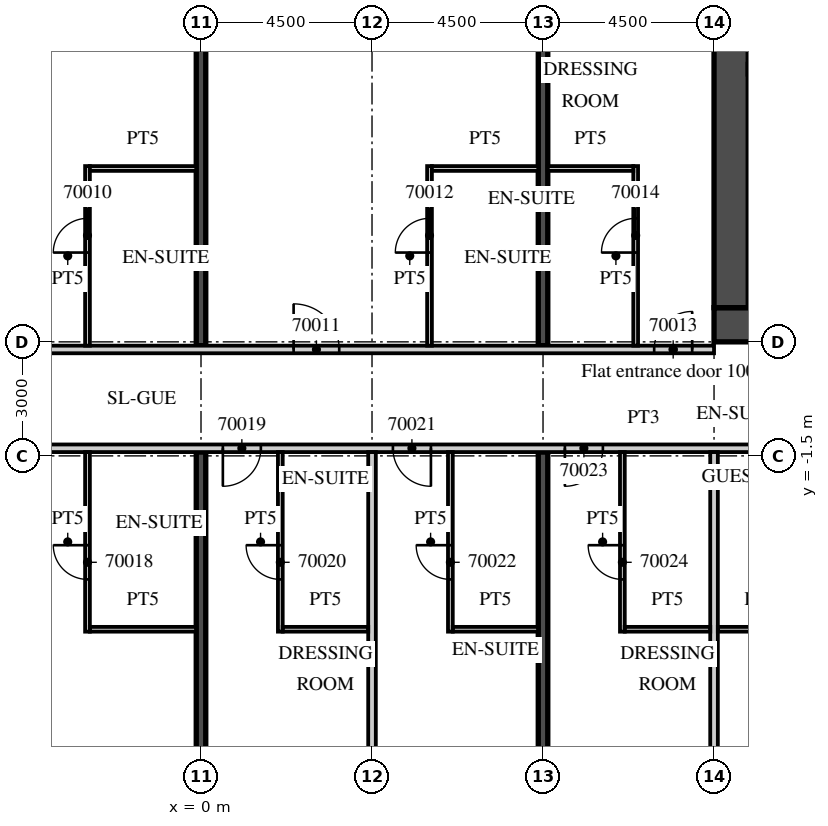
"""IFC4 building model, lengths in metres.
Left out: names, types, materials, properties, quantities, classifications, styles, units other than length and angle.
Written with IfcOpenShell. Run it as: python <this file> out.ifc"""

import sys

from ifc_helpers import new_model, si_unit, direction, frame, frame_2d, origin, place, context, subcontext, project, spatial, rectangle, extrude, element, fill, save


model = new_model("IFC4")
c1 = context("Model", 3, precision=1e-05, world=origin(), true_north=direction((0.0, 1.0)))
c2 = subcontext(c1, "Body", "Model", "MODEL_VIEW")
j1 = project(units=[si_unit("LENGTHUNIT", "METRE"), si_unit("PLANEANGLEUNIT", "RADIAN")], contexts=[c1])
p1 = place(None, origin())
s1 = spatial("IfcSite", under=j1, at=p1, CompositionType="ELEMENT")
p2 = place(p1, origin())
s2 = spatial("IfcBuilding", under=s1, at=p2, CompositionType="ELEMENT")
p3 = place(p2, frame((0.0, 0.0, 281.7)))
s3 = spatial("IfcBuildingStorey", under=s2, at=p3, CompositionType="ELEMENT", Elevation=281.7)
p4 = place(p3, frame((0.0, -20.074, 0.0), z_axis=(0.0, 0.0, 1.0), x_axis=(0.0, 1.0, 0.0)))
e1 = element("IfcWall", 1, at=p4, inside=s3, PredefinedType="SHEAR", context=c2, shape_type="SweptSolid", body=[
    extrude(rectangle(XDim=18.674, YDim=0.25, at=frame_2d((9.337, 0.0))), origin(), (0.0, 0.0, 1.0), 3.3),
])
p5 = place(p3, frame((0.0, 1.4, 0.0), z_axis=(0.0, 0.0, 1.0), x_axis=(0.0, 1.0, 0.0)))
e2 = element("IfcWall", 2, at=p5, inside=s3, PredefinedType="SHEAR", context=c2, shape_type="SweptSolid", body=[
    extrude(rectangle(XDim=17.763, YDim=0.25, at=frame_2d((8.881, 0.0))), origin(), (0.0, 0.0, 1.0), 3.3),
])
p6 = place(p3, frame((9.0, -19.207, 0.0), z_axis=(0.0, 0.0, 1.0), x_axis=(0.0, 1.0, 0.0)))
e3 = element("IfcWall", 3, at=p6, inside=s3, PredefinedType="SHEAR", context=c2, shape_type="SweptSolid", body=[
    extrude(rectangle(XDim=17.807, YDim=0.25, at=frame_2d((8.904, 0.0))), origin(), (0.0, 0.0, 1.0), 3.3),
])
p7 = place(p3, frame((9.0, 1.4, 0.0), z_axis=(0.0, 0.0, 1.0), x_axis=(0.0, 1.0, 0.0)))
e4 = element("IfcWall", 4, at=p7, inside=s3, PredefinedType="SHEAR", context=c2, shape_type="SweptSolid", body=[
    extrude(rectangle(XDim=18.629, YDim=0.25, at=frame_2d((9.315, 0.0))), origin(), (0.0, 0.0, 1.0), 3.3),
])
p8 = place(p3, frame((-39.909, 1.3, 0.0), z_axis=(0.0, 0.0, 1.0), x_axis=(1.0, 0.0, 0.0)))
e5 = element("IfcWall", 5, at=p8, inside=s3, PredefinedType="PARTITIONING", context=c2, shape_type="SweptSolid", body=[
    extrude(rectangle(XDim=53.409, YDim=0.2, at=frame_2d((26.705, 0.0))), origin(), (0.0, 0.0, 1.0), 3.02),
])
p9 = place(p8, frame((0.15, 0.0, 0.0)))
e6 = element("IfcOpeningElement", 6, at=p9, cuts=e5, PredefinedType="OPENING", context=c2, shape_type="SweptSolid", body=[
    extrude(rectangle(XDim=0.9, YDim=2.1, at=frame_2d((0.45, 1.05))), frame((0.0, 0.11, 0.0), z_axis=(0.0, -1.0, 0.0), x_axis=(1.0, 0.0, 0.0)), (0.0, 0.0, 1.0), 0.22),
])
p10 = place(p8, frame((6.347, 0.0, 0.0)))
e7 = element("IfcOpeningElement", 7, at=p10, cuts=e5, PredefinedType="OPENING", context=c2, shape_type="SweptSolid", body=[
    extrude(rectangle(XDim=1.2, YDim=2.1, at=frame_2d((0.6, 1.05))), frame((0.0, 0.11, 0.0), z_axis=(0.0, -1.0, 0.0), x_axis=(1.0, 0.0, 0.0)), (0.0, 0.0, 1.0), 0.22),
])
p11 = place(p8, frame((15.347, 0.0, 0.0)))
e8 = element("IfcOpeningElement", 8, at=p11, cuts=e5, PredefinedType="OPENING", context=c2, shape_type="SweptSolid", body=[
    extrude(rectangle(XDim=1.2, YDim=2.1, at=frame_2d((0.6, 1.05))), frame((0.0, 0.11, 0.0), z_axis=(0.0, -1.0, 0.0), x_axis=(1.0, 0.0, 0.0)), (0.0, 0.0, 1.0), 0.22),
])
p12 = place(p8, frame((24.346, 0.0, 0.0)))
e9 = element("IfcOpeningElement", 9, at=p12, cuts=e5, PredefinedType="OPENING", context=c2, shape_type="SweptSolid", body=[
    extrude(rectangle(XDim=1.2, YDim=2.1, at=frame_2d((0.6, 1.05))), frame((0.0, 0.11, 0.0), z_axis=(0.0, -1.0, 0.0), x_axis=(1.0, 0.0, 0.0)), (0.0, 0.0, 1.0), 0.22),
])
p13 = place(p8, frame((33.346, 0.0, 0.0)))
e10 = element("IfcOpeningElement", 10, at=p13, cuts=e5, PredefinedType="OPENING", context=c2, shape_type="SweptSolid", body=[
    extrude(rectangle(XDim=1.2, YDim=2.1, at=frame_2d((0.6, 1.05))), frame((0.0, 0.11, 0.0), z_axis=(0.0, -1.0, 0.0), x_axis=(1.0, 0.0, 0.0)), (0.0, 0.0, 1.0), 0.22),
])
p14 = place(p8, frame((42.346, 0.0, 0.0)))
e11 = element("IfcOpeningElement", 11, at=p14, cuts=e5, PredefinedType="OPENING", context=c2, shape_type="SweptSolid", body=[
    extrude(rectangle(XDim=1.2, YDim=2.1, at=frame_2d((0.6, 1.05))), frame((0.0, 0.11, 0.0), z_axis=(0.0, -1.0, 0.0), x_axis=(1.0, 0.0, 0.0)), (0.0, 0.0, 1.0), 0.22),
])
p15 = place(p8, frame((51.834, 0.0, 0.0)))
e12 = element("IfcOpeningElement", 12, at=p15, cuts=e5, PredefinedType="OPENING", context=c2, shape_type="SweptSolid", body=[
    extrude(rectangle(XDim=1.0, YDim=2.1, at=frame_2d((0.5, 1.05))), frame((0.0, 0.11, 0.0), z_axis=(0.0, -1.0, 0.0), x_axis=(1.0, 0.0, 0.0)), (0.0, 0.0, 1.0), 0.22),
])
p16 = place(p3, frame((-2.987, 1.4, 0.0), z_axis=(0.0, 0.0, 1.0), x_axis=(0.0, 1.0, 0.0)))
e13 = element("IfcWall", 13, at=p16, inside=s3, PredefinedType="PARTITIONING", context=c2, shape_type="SweptSolid", body=[
    extrude(rectangle(XDim=4.725, YDim=0.125, at=frame_2d((2.363, 0.0))), origin(), (0.0, 0.0, 1.0), 3.02),
])
p17 = place(p16, frame((2.45, 0.0, 0.0)))
e14 = element("IfcOpeningElement", 14, at=p17, cuts=e13, PredefinedType="OPENING", context=c2, shape_type="SweptSolid", body=[
    extrude(rectangle(XDim=0.9, YDim=2.1, at=frame_2d((0.45, 1.05))), frame((0.0, 0.073, 0.0), z_axis=(0.0, -1.0, 0.0), x_axis=(1.0, 0.0, 0.0)), (0.0, 0.0, 1.0), 0.145),
])
p18 = place(p3, frame((-2.925, 6.062, 0.0), z_axis=(0.0, 0.0, 1.0), x_axis=(1.0, 0.0, 0.0)))
e15 = element("IfcWall", 15, at=p18, inside=s3, PredefinedType="PARTITIONING", context=c2, shape_type="SweptSolid", body=[
    extrude(rectangle(XDim=2.8, YDim=0.125, at=frame_2d((1.4, 0.0))), origin(), (0.0, 0.0, 1.0), 3.02),
])
p19 = place(p3, frame((6.013, 1.4, 0.0), z_axis=(0.0, 0.0, 1.0), x_axis=(0.0, 1.0, 0.0)))
e16 = element("IfcWall", 16, at=p19, inside=s3, PredefinedType="PARTITIONING", context=c2, shape_type="SweptSolid", body=[
    extrude(rectangle(XDim=4.725, YDim=0.125, at=frame_2d((2.363, 0.0))), origin(), (0.0, 0.0, 1.0), 3.02),
])
p20 = place(p19, frame((2.45, 0.0, 0.0)))
e17 = element("IfcOpeningElement", 17, at=p20, cuts=e16, PredefinedType="OPENING", context=c2, shape_type="SweptSolid", body=[
    extrude(rectangle(XDim=0.9, YDim=2.1, at=frame_2d((0.45, 1.05))), frame((0.0, 0.073, 0.0), z_axis=(0.0, -1.0, 0.0), x_axis=(1.0, 0.0, 0.0)), (0.0, 0.0, 1.0), 0.145),
])
p21 = place(p3, frame((6.075, 6.062, 0.0), z_axis=(0.0, 0.0, 1.0), x_axis=(1.0, 0.0, 0.0)))
e18 = element("IfcWall", 18, at=p21, inside=s3, PredefinedType="PARTITIONING", context=c2, shape_type="SweptSolid", body=[
    extrude(rectangle(XDim=2.8, YDim=0.125, at=frame_2d((1.4, 0.0))), origin(), (0.0, 0.0, 1.0), 3.02),
])
p22 = place(p3, frame((11.438, 1.4, 0.0), z_axis=(0.0, 0.0, 1.0), x_axis=(0.0, 1.0, 0.0)))
e19 = element("IfcWall", 19, at=p22, inside=s3, PredefinedType="PARTITIONING", context=c2, shape_type="SweptSolid", body=[
    extrude(rectangle(XDim=4.725, YDim=0.125, at=frame_2d((2.363, 0.0))), origin(), (0.0, 0.0, 1.0), 3.02),
])
p23 = place(p22, frame((2.45, 0.0, 0.0)))
e20 = element("IfcOpeningElement", 20, at=p23, cuts=e19, PredefinedType="OPENING", context=c2, shape_type="SweptSolid", body=[
    extrude(rectangle(XDim=0.9, YDim=2.1, at=frame_2d((0.45, 1.05))), frame((0.0, 0.073, 0.0), z_axis=(0.0, -1.0, 0.0), x_axis=(1.0, 0.0, 0.0)), (0.0, 0.0, 1.0), 0.145),
])
p24 = place(p3, frame((9.125, 6.062, 0.0), z_axis=(0.0, 0.0, 1.0), x_axis=(1.0, 0.0, 0.0)))
e21 = element("IfcWall", 21, at=p24, inside=s3, PredefinedType="PARTITIONING", context=c2, shape_type="SweptSolid", body=[
    extrude(rectangle(XDim=2.25, YDim=0.125, at=frame_2d((1.125, 0.0))), origin(), (0.0, 0.0, 1.0), 3.02),
])
p25 = place(p3, frame((-13.5, -1.3, 0.0), z_axis=(0.0, 0.0, 1.0), x_axis=(1.0, 0.0, 0.0)))
e22 = element("IfcWall", 22, at=p25, inside=s3, PredefinedType="PARTITIONING", context=c2, shape_type="SweptSolid", body=[
    extrude(rectangle(XDim=50.293, YDim=0.2, at=frame_2d((25.146, 0.0))), origin(), (0.0, 0.0, 1.0), 3.02),
])
p26 = place(p25, frame((2.925, 0.0, 0.0)))
e23 = element("IfcOpeningElement", 23, at=p26, cuts=e22, PredefinedType="OPENING", context=c2, shape_type="SweptSolid", body=[
    extrude(rectangle(XDim=1.0, YDim=2.1, at=frame_2d((0.5, 1.05))), frame((0.0, 0.11, 0.0), z_axis=(0.0, -1.0, 0.0), x_axis=(1.0, 0.0, 0.0)), (0.0, 0.0, 1.0), 0.22),
])
p27 = place(p25, frame((6.938, 0.0, 0.0)))
e24 = element("IfcOpeningElement", 24, at=p27, cuts=e22, PredefinedType="OPENING", context=c2, shape_type="SweptSolid", body=[
    extrude(rectangle(XDim=1.2, YDim=2.1, at=frame_2d((0.6, 1.05))), frame((0.0, 0.11, 0.0), z_axis=(0.0, -1.0, 0.0), x_axis=(1.0, 0.0, 0.0)), (0.0, 0.0, 1.0), 0.22),
])
p28 = place(p25, frame((14.075, 0.0, 0.0)))
e25 = element("IfcOpeningElement", 25, at=p28, cuts=e22, PredefinedType="OPENING", context=c2, shape_type="SweptSolid", body=[
    extrude(rectangle(XDim=1.0, YDim=2.1, at=frame_2d((0.5, 1.05))), frame((0.0, 0.11, 0.0), z_axis=(0.0, -1.0, 0.0), x_axis=(1.0, 0.0, 0.0)), (0.0, 0.0, 1.0), 0.22),
])
p29 = place(p25, frame((18.55, 0.0, 0.0)))
e26 = element("IfcOpeningElement", 26, at=p29, cuts=e22, PredefinedType="OPENING", context=c2, shape_type="SweptSolid", body=[
    extrude(rectangle(XDim=1.0, YDim=2.1, at=frame_2d((0.5, 1.05))), frame((0.0, 0.11, 0.0), z_axis=(0.0, -1.0, 0.0), x_axis=(1.0, 0.0, 0.0)), (0.0, 0.0, 1.0), 0.22),
])
p30 = place(p25, frame((23.075, 0.0, 0.0)))
e27 = element("IfcOpeningElement", 27, at=p30, cuts=e22, PredefinedType="OPENING", context=c2, shape_type="SweptSolid", body=[
    extrude(rectangle(XDim=1.0, YDim=2.1, at=frame_2d((0.5, 1.05))), frame((0.0, 0.11, 0.0), z_axis=(0.0, -1.0, 0.0), x_axis=(1.0, 0.0, 0.0)), (0.0, 0.0, 1.0), 0.22),
])
p31 = place(p25, frame((29.925, 0.0, 0.0)))
e28 = element("IfcOpeningElement", 28, at=p31, cuts=e22, PredefinedType="OPENING", context=c2, shape_type="SweptSolid", body=[
    extrude(rectangle(XDim=1.0, YDim=2.1, at=frame_2d((0.5, 1.05))), frame((0.0, 0.11, 0.0), z_axis=(0.0, -1.0, 0.0), x_axis=(1.0, 0.0, 0.0)), (0.0, 0.0, 1.0), 0.22),
])
p32 = place(p25, frame((32.075, 0.0, 0.0)))
e29 = element("IfcOpeningElement", 29, at=p32, cuts=e22, PredefinedType="OPENING", context=c2, shape_type="SweptSolid", body=[
    extrude(rectangle(XDim=1.0, YDim=2.1, at=frame_2d((0.5, 1.05))), frame((0.0, 0.11, 0.0), z_axis=(0.0, -1.0, 0.0), x_axis=(1.0, 0.0, 0.0)), (0.0, 0.0, 1.0), 0.22),
])
p33 = place(p25, frame((36.55, 0.0, 0.0)))
e30 = element("IfcOpeningElement", 30, at=p33, cuts=e22, PredefinedType="OPENING", context=c2, shape_type="SweptSolid", body=[
    extrude(rectangle(XDim=1.0, YDim=2.1, at=frame_2d((0.5, 1.05))), frame((0.0, 0.11, 0.0), z_axis=(0.0, -1.0, 0.0), x_axis=(1.0, 0.0, 0.0)), (0.0, 0.0, 1.0), 0.22),
])
p34 = place(p25, frame((42.938, 0.0, 0.0)))
e31 = element("IfcOpeningElement", 31, at=p34, cuts=e22, PredefinedType="OPENING", context=c2, shape_type="SweptSolid", body=[
    extrude(rectangle(XDim=1.2, YDim=2.1, at=frame_2d((0.6, 1.05))), frame((0.0, 0.11, 0.0), z_axis=(0.0, -1.0, 0.0), x_axis=(1.0, 0.0, 0.0)), (0.0, 0.0, 1.0), 0.22),
])
p35 = place(p3, frame((-2.987, -6.125, 0.0), z_axis=(0.0, 0.0, 1.0), x_axis=(0.0, 1.0, 0.0)))
e32 = element("IfcWall", 32, at=p35, inside=s3, PredefinedType="PARTITIONING", context=c2, shape_type="SweptSolid", body=[
    extrude(rectangle(XDim=4.725, YDim=0.125, at=frame_2d((2.363, 0.0))), origin(), (0.0, 0.0, 1.0), 3.02),
])
p36 = place(p35, frame((1.375, 0.0, 0.0)))
e33 = element("IfcOpeningElement", 33, at=p36, cuts=e32, PredefinedType="OPENING", context=c2, shape_type="SweptSolid", body=[
    extrude(rectangle(XDim=0.9, YDim=2.1, at=frame_2d((0.45, 1.05))), frame((0.0, 0.073, 0.0), z_axis=(0.0, -1.0, 0.0), x_axis=(1.0, 0.0, 0.0)), (0.0, 0.0, 1.0), 0.145),
])
p37 = place(p3, frame((-2.925, -6.062, 0.0), z_axis=(0.0, 0.0, 1.0), x_axis=(1.0, 0.0, 0.0)))
e34 = element("IfcWall", 34, at=p37, inside=s3, PredefinedType="PARTITIONING", context=c2, shape_type="SweptSolid", body=[
    extrude(rectangle(XDim=2.8, YDim=0.125, at=frame_2d((1.4, 0.0))), origin(), (0.0, 0.0, 1.0), 3.02),
])
p38 = place(p3, frame((4.5, -19.663, 0.0), z_axis=(0.0, 0.0, 1.0), x_axis=(0.0, 1.0, 0.0)))
e35 = element("IfcWall", 35, at=p38, inside=s3, PredefinedType="PARTITIONING", context=c2, shape_type="SweptSolid", body=[
    extrude(rectangle(XDim=18.263, YDim=0.2, at=frame_2d((9.132, 0.0))), origin(), (0.0, 0.0, 1.0), 3.02),
])
p39 = place(p3, frame((2.087, -6.125, 0.0), z_axis=(0.0, 0.0, 1.0), x_axis=(0.0, 1.0, 0.0)))
e36 = element("IfcWall", 36, at=p39, inside=s3, PredefinedType="PARTITIONING", context=c2, shape_type="SweptSolid", body=[
    extrude(rectangle(XDim=4.725, YDim=0.125, at=frame_2d((2.363, 0.0))), origin(), (0.0, 0.0, 1.0), 3.02),
])
p40 = place(p39, frame((1.375, 0.0, 0.0)))
e37 = element("IfcOpeningElement", 37, at=p40, cuts=e36, PredefinedType="OPENING", context=c2, shape_type="SweptSolid", body=[
    extrude(rectangle(XDim=0.9, YDim=2.1, at=frame_2d((0.45, 1.05))), frame((0.0, 0.073, 0.0), z_axis=(0.0, -1.0, 0.0), x_axis=(1.0, 0.0, 0.0)), (0.0, 0.0, 1.0), 0.145),
])
p41 = place(p3, frame((2.15, -6.062, 0.0), z_axis=(0.0, 0.0, 1.0), x_axis=(1.0, 0.0, 0.0)))
e38 = element("IfcWall", 38, at=p41, inside=s3, PredefinedType="PARTITIONING", context=c2, shape_type="SweptSolid", body=[
    extrude(rectangle(XDim=2.25, YDim=0.125, at=frame_2d((1.125, 0.0))), origin(), (0.0, 0.0, 1.0), 3.02),
])
p42 = place(p3, frame((6.562, -6.125, 0.0), z_axis=(0.0, 0.0, 1.0), x_axis=(0.0, 1.0, 0.0)))
e39 = element("IfcWall", 39, at=p42, inside=s3, PredefinedType="PARTITIONING", context=c2, shape_type="SweptSolid", body=[
    extrude(rectangle(XDim=4.725, YDim=0.125, at=frame_2d((2.363, 0.0))), origin(), (0.0, 0.0, 1.0), 3.02),
])
p43 = place(p42, frame((1.375, 0.0, 0.0)))
e40 = element("IfcOpeningElement", 40, at=p43, cuts=e39, PredefinedType="OPENING", context=c2, shape_type="SweptSolid", body=[
    extrude(rectangle(XDim=0.9, YDim=2.1, at=frame_2d((0.45, 1.05))), frame((0.0, 0.073, 0.0), z_axis=(0.0, -1.0, 0.0), x_axis=(1.0, 0.0, 0.0)), (0.0, 0.0, 1.0), 0.145),
])
p44 = place(p3, frame((6.625, -6.062, 0.0), z_axis=(0.0, 0.0, 1.0), x_axis=(1.0, 0.0, 0.0)))
e41 = element("IfcWall", 41, at=p44, inside=s3, PredefinedType="PARTITIONING", context=c2, shape_type="SweptSolid", body=[
    extrude(rectangle(XDim=2.25, YDim=0.125, at=frame_2d((1.125, 0.0))), origin(), (0.0, 0.0, 1.0), 3.02),
])
p45 = place(p3, frame((13.5, -18.796, 0.0), z_axis=(0.0, 0.0, 1.0), x_axis=(0.0, 1.0, 0.0)))
e42 = element("IfcWall", 42, at=p45, inside=s3, PredefinedType="PARTITIONING", context=c2, shape_type="SweptSolid", body=[
    extrude(rectangle(XDim=17.396, YDim=0.2, at=frame_2d((8.698, 0.0))), origin(), (0.0, 0.0, 1.0), 3.02),
])
p46 = place(p3, frame((11.088, -6.125, 0.0), z_axis=(0.0, 0.0, 1.0), x_axis=(0.0, 1.0, 0.0)))
e43 = element("IfcWall", 43, at=p46, inside=s3, PredefinedType="PARTITIONING", context=c2, shape_type="SweptSolid", body=[
    extrude(rectangle(XDim=4.725, YDim=0.125, at=frame_2d((2.363, 0.0))), origin(), (0.0, 0.0, 1.0), 3.02),
])
p47 = place(p46, frame((1.375, 0.0, 0.0)))
e44 = element("IfcOpeningElement", 44, at=p47, cuts=e43, PredefinedType="OPENING", context=c2, shape_type="SweptSolid", body=[
    extrude(rectangle(XDim=0.9, YDim=2.1, at=frame_2d((0.45, 1.05))), frame((0.0, 0.073, 0.0), z_axis=(0.0, -1.0, 0.0), x_axis=(1.0, 0.0, 0.0)), (0.0, 0.0, 1.0), 0.145),
])
for number, where, z_axis, x_axis in (
    (45, (11.15, -6.062, 0.0), (0.0, 0.0, 1.0), (1.0, 0.0, 0.0)),
    (46, (13.6, -6.062, 0.0), (0.0, 0.0, 1.0), (1.0, 0.0, 0.0)),
):
    element("IfcWall", number, at=place(p3, frame(where, z_axis=z_axis, x_axis=x_axis)), inside=s3, PredefinedType="PARTITIONING", context=c2, shape_type="SweptSolid", body=[
        extrude(rectangle(XDim=2.25, YDim=0.125, at=frame_2d((1.125, 0.0))), origin(), (0.0, 0.0, 1.0), 3.02),
    ])
p48 = place(p3, frame((13.5, 1.95, 0.0), z_axis=(0.0, 0.0, 1.0), x_axis=(1.0, 0.0, 0.0)))
e47 = element("IfcWall", 47, at=p48, inside=s3, PredefinedType="SHEAR", context=c2, shape_type="SweptSolid", body=[
    extrude(rectangle(XDim=18.0, YDim=0.9, at=frame_2d((9.0, 0.0))), origin(), (0.0, 0.0, 1.0), 3.02),
])
p49 = place(p48, frame((1.475, 0.0, 0.0)))
e48 = element("IfcOpeningElement", 48, at=p49, cuts=e47, PredefinedType="OPENING", context=c2, shape_type="SweptSolid", body=[
    extrude(rectangle(XDim=1.8, YDim=2.1, at=frame_2d((0.9, 1.05))), frame((0.0, 0.46, 0.0), z_axis=(0.0, -1.0, 0.0), x_axis=(1.0, 0.0, 0.0)), (0.0, 0.0, 1.0), 0.92),
])
p50 = place(p3, frame((13.95, 2.4, 0.0), z_axis=(0.0, 0.0, 1.0), x_axis=(0.0, 1.0, 0.0)))
e49 = element("IfcWall", 49, at=p50, inside=s3, PredefinedType="SHEAR", context=c2, shape_type="SweptSolid", body=[
    extrude(rectangle(XDim=12.2, YDim=0.9, at=frame_2d((6.1, 0.0))), origin(), (0.0, 0.0, 1.0), 3.02),
])
p51 = place(p17, origin())
e50 = element("IfcDoor", 50, at=p51, inside=s3, OperationType="SINGLE_SWING_LEFT", PredefinedType="DOOR", context=c2, shape_type="SweptSolid", body=[
    extrude(rectangle(XDim=0.9, YDim=2.1, at=frame_2d((0.45, 1.05))), frame((0.0, 0.025, 0.0), z_axis=(0.0, -1.0, 0.0), x_axis=(1.0, 0.0, 0.0)), (0.0, 0.0, 1.0), 0.05),
])
fill(e14, e50)
p52 = place(p14, origin())
e51 = element("IfcDoor", 51, at=p52, inside=s3, OperationType="SINGLE_SWING_LEFT", PredefinedType="DOOR", context=c2, shape_type="SweptSolid", body=[
    extrude(rectangle(XDim=1.2, YDim=2.1, at=frame_2d((0.6, 1.05))), frame((0.0, 0.025, 0.0), z_axis=(0.0, -1.0, 0.0), x_axis=(1.0, 0.0, 0.0)), (0.0, 0.0, 1.0), 0.05),
])
fill(e11, e51)
p53 = place(p20, origin())
e52 = element("IfcDoor", 52, at=p53, inside=s3, OperationType="SINGLE_SWING_LEFT", PredefinedType="DOOR", context=c2, shape_type="SweptSolid", body=[
    extrude(rectangle(XDim=0.9, YDim=2.1, at=frame_2d((0.45, 1.05))), frame((0.0, 0.025, 0.0), z_axis=(0.0, -1.0, 0.0), x_axis=(1.0, 0.0, 0.0)), (0.0, 0.0, 1.0), 0.05),
])
fill(e17, e52)
p54 = place(p15, origin())
e53 = element("IfcDoor", 53, at=p54, inside=s3, OperationType="SINGLE_SWING_RIGHT", PredefinedType="DOOR", context=c2, shape_type="SweptSolid", body=[
    extrude(rectangle(XDim=1.0, YDim=2.1, at=frame_2d((0.5, 1.05))), frame((0.0, 0.025, 0.0), z_axis=(0.0, -1.0, 0.0), x_axis=(1.0, 0.0, 0.0)), (0.0, 0.0, 1.0), 0.05),
])
fill(e12, e53)
p55 = place(p23, origin())
e54 = element("IfcDoor", 54, at=p55, inside=s3, OperationType="SINGLE_SWING_LEFT", PredefinedType="DOOR", context=c2, shape_type="SweptSolid", body=[
    extrude(rectangle(XDim=0.9, YDim=2.1, at=frame_2d((0.45, 1.05))), frame((0.0, 0.025, 0.0), z_axis=(0.0, -1.0, 0.0), x_axis=(1.0, 0.0, 0.0)), (0.0, 0.0, 1.0), 0.05),
])
fill(e20, e54)
p56 = place(p36, origin())
e55 = element("IfcDoor", 55, at=p56, inside=s3, OperationType="SINGLE_SWING_RIGHT", PredefinedType="DOOR", context=c2, shape_type="SweptSolid", body=[
    extrude(rectangle(XDim=0.9, YDim=2.1, at=frame_2d((0.45, 1.05))), frame((0.0, 0.025, 0.0), z_axis=(0.0, -1.0, 0.0), x_axis=(1.0, 0.0, 0.0)), (0.0, 0.0, 1.0), 0.05),
])
fill(e33, e55)
p57 = place(p28, origin())
e56 = element("IfcDoor", 56, at=p57, inside=s3, OperationType="SINGLE_SWING_LEFT", PredefinedType="DOOR", context=c2, shape_type="SweptSolid", body=[
    extrude(rectangle(XDim=1.0, YDim=2.1, at=frame_2d((0.5, 1.05))), frame((0.0, 0.025, 0.0), z_axis=(0.0, -1.0, 0.0), x_axis=(1.0, 0.0, 0.0)), (0.0, 0.0, 1.0), 0.05),
])
fill(e25, e56)
p58 = place(p40, origin())
e57 = element("IfcDoor", 57, at=p58, inside=s3, OperationType="SINGLE_SWING_RIGHT", PredefinedType="DOOR", context=c2, shape_type="SweptSolid", body=[
    extrude(rectangle(XDim=0.9, YDim=2.1, at=frame_2d((0.45, 1.05))), frame((0.0, 0.025, 0.0), z_axis=(0.0, -1.0, 0.0), x_axis=(1.0, 0.0, 0.0)), (0.0, 0.0, 1.0), 0.05),
])
fill(e37, e57)
p59 = place(p29, origin())
e58 = element("IfcDoor", 58, at=p59, inside=s3, OperationType="SINGLE_SWING_RIGHT", PredefinedType="DOOR", context=c2, shape_type="SweptSolid", body=[
    extrude(rectangle(XDim=1.0, YDim=2.1, at=frame_2d((0.5, 1.05))), frame((0.0, 0.025, 0.0), z_axis=(0.0, -1.0, 0.0), x_axis=(1.0, 0.0, 0.0)), (0.0, 0.0, 1.0), 0.05),
])
fill(e26, e58)
p60 = place(p43, origin())
e59 = element("IfcDoor", 59, at=p60, inside=s3, OperationType="SINGLE_SWING_RIGHT", PredefinedType="DOOR", context=c2, shape_type="SweptSolid", body=[
    extrude(rectangle(XDim=0.9, YDim=2.1, at=frame_2d((0.45, 1.05))), frame((0.0, 0.025, 0.0), z_axis=(0.0, -1.0, 0.0), x_axis=(1.0, 0.0, 0.0)), (0.0, 0.0, 1.0), 0.05),
])
fill(e40, e59)
p61 = place(p30, origin())
e60 = element("IfcDoor", 60, at=p61, inside=s3, OperationType="SINGLE_SWING_LEFT", PredefinedType="DOOR", context=c2, shape_type="SweptSolid", body=[
    extrude(rectangle(XDim=1.0, YDim=2.1, at=frame_2d((0.5, 1.05))), frame((0.0, 0.025, 0.0), z_axis=(0.0, -1.0, 0.0), x_axis=(1.0, 0.0, 0.0)), (0.0, 0.0, 1.0), 0.05),
])
fill(e27, e60)
p62 = place(p47, origin())
e61 = element("IfcDoor", 61, at=p62, inside=s3, OperationType="SINGLE_SWING_RIGHT", PredefinedType="DOOR", context=c2, shape_type="SweptSolid", body=[
    extrude(rectangle(XDim=0.9, YDim=2.1, at=frame_2d((0.45, 1.05))), frame((0.0, 0.025, 0.0), z_axis=(0.0, -1.0, 0.0), x_axis=(1.0, 0.0, 0.0)), (0.0, 0.0, 1.0), 0.05),
])
fill(e44, e61)
save(model, sys.argv[1])
